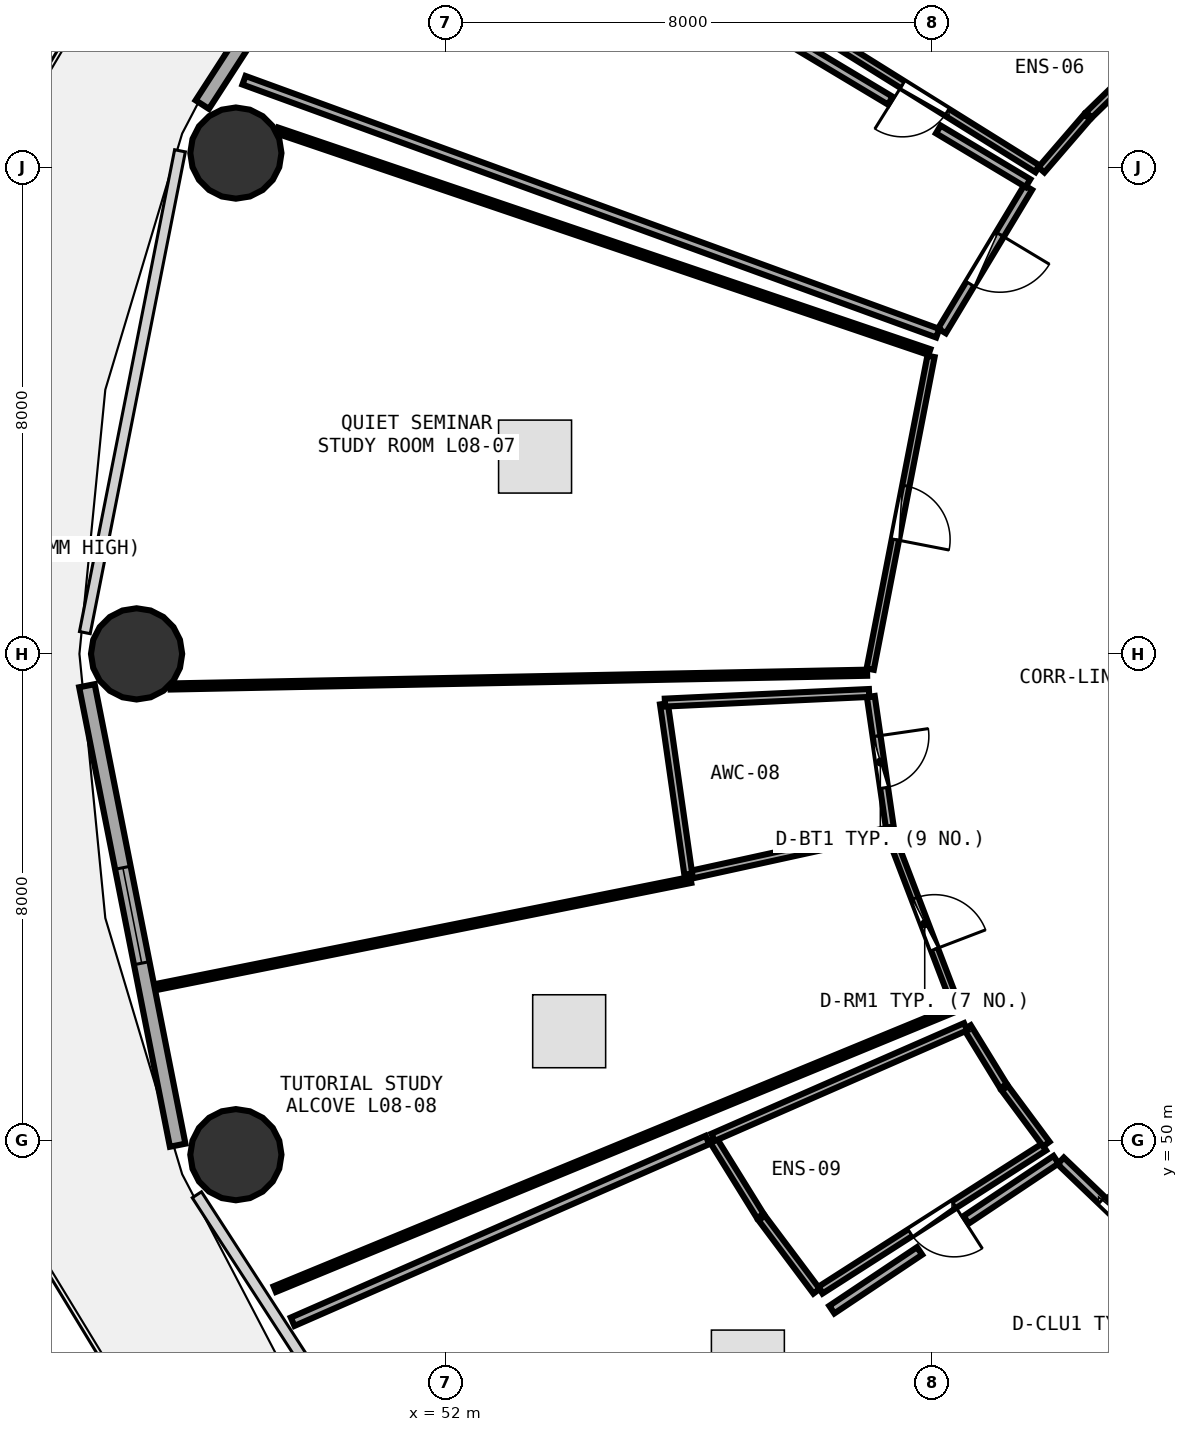
"""IFC4 building model, lengths in metres.
Left out: names, types, materials, properties, quantities, classifications, styles, units other than length and angle.
Written with IfcOpenShell. Run it as: python <this file> out.ifc"""

import sys

from ifc_helpers import new_model, si_unit, direction, frame, frame_2d, origin, origin_2d, place, context, subcontext, project, spatial, rectangle, circle, extrude, element, fill, save


model = new_model("IFC4")
c1 = context("Model", 3, precision=1e-05, world=origin(), true_north=direction((0.0, 1.0)))
c2 = subcontext(c1, "Body", "Model", "MODEL_VIEW")
j1 = project(units=[si_unit("LENGTHUNIT", "METRE"), si_unit("PLANEANGLEUNIT", "RADIAN")], contexts=[c1])
p1 = place(None, origin())
s1 = spatial("IfcSite", under=j1, at=p1, CompositionType="ELEMENT")
p2 = place(p1, origin())
s2 = spatial("IfcBuilding", under=s1, at=p2, CompositionType="ELEMENT")
p3 = place(p2, frame((0.0, 0.0, 33.75)))
s3 = spatial("IfcBuildingStorey", under=s2, at=p3, CompositionType="ELEMENT", Elevation=33.75)
for number, where, z_axis, x_axis in (
    (1, (48.553, 66.236, 0.0), (0.0, 0.0, 1.0), (1.0, 0.0, 0.0)),
    (2, (46.92, 58.0, 0.0), (0.0, 0.0, 1.0), (1.0, 0.0, 0.0)),
    (3, (48.553, 49.764, 0.0), (0.0, 0.0, 1.0), (1.0, 0.0, 0.0)),
):
    element("IfcColumn", number, at=place(p3, frame(where, z_axis=z_axis, x_axis=x_axis)), inside=s3, PredefinedType="COLUMN", context=c2, shape_type="SweptSolid", body=[
        extrude(circle(Radius=0.75, at=origin_2d()), origin(), (0.0, 0.0, 1.0), 3.75),
    ])
p4 = place(p3, frame((52.311, 73.698, 0.0), z_axis=(0.0, 0.0, 1.0), x_axis=(-0.543005114258, -0.839729388488, 0.0)))
e4 = element("IfcWall", 4, at=p4, inside=s3, PredefinedType="SOLIDWALL", context=c2, shape_type="SweptSolid", body=[
    extrude(rectangle(XDim=7.938, YDim=0.26, at=frame_2d((3.969, 0.0))), origin(), (0.0, 0.0, 1.0), 3.475),
])
p5 = place(p4, frame((3.494, 0.0, 0.0)))
e5 = element("IfcOpeningElement", 5, at=p5, cuts=e4, PredefinedType="OPENING", context=c2, shape_type="SweptSolid", body=[
    extrude(rectangle(XDim=0.95, YDim=2.1, at=frame_2d((0.475, 1.05))), frame((0.0, 0.14, 0.0), z_axis=(0.0, -1.0, 0.0), x_axis=(1.0, 0.0, 0.0)), (0.0, 0.0, 1.0), 0.28),
])
p6 = place(p4, frame((4.794, 0.0, 0.85)))
e6 = element("IfcOpeningElement", 6, at=p6, cuts=e4, PredefinedType="OPENING", context=c2, shape_type="SweptSolid", body=[
    extrude(rectangle(XDim=1.2, YDim=1.45, at=frame_2d((0.6, 0.725))), frame((0.0, 0.14, 0.0), z_axis=(0.0, -1.0, 0.0), x_axis=(1.0, 0.0, 0.0)), (0.0, 0.0, 1.0), 0.28),
])
p7 = place(p3, frame((46.104, 57.477, 0.0), z_axis=(0.0, 0.0, 1.0), x_axis=(0.193726159581, -0.98105564322, 0.0)))
e7 = element("IfcWall", 7, at=p7, inside=s3, PredefinedType="SOLIDWALL", context=c2, shape_type="SweptSolid", body=[
    extrude(rectangle(XDim=7.703, YDim=0.26, at=frame_2d((3.851, 0.0))), origin(), (0.0, 0.0, 1.0), 3.475),
])
p8 = place(p7, frame((3.051, 0.0, 0.85)))
e8 = element("IfcOpeningElement", 8, at=p8, cuts=e7, PredefinedType="OPENING", context=c2, shape_type="SweptSolid", body=[
    extrude(rectangle(XDim=1.6, YDim=1.45, at=frame_2d((0.8, 0.725))), frame((0.0, 0.14, 0.0), z_axis=(0.0, -1.0, 0.0), x_axis=(1.0, 0.0, 0.0)), (0.0, 0.0, 1.0), 0.28),
])
p9 = place(p3, frame((61.737, 65.977, 0.0), z_axis=(0.0, 0.0, 1.0), x_axis=(-0.848252205707, 0.529592480605, 0.0)))
e9 = element("IfcWall", 9, at=p9, inside=s3, PredefinedType="PLUMBINGWALL", context=c2, shape_type="SweptSolid", body=[
    extrude(rectangle(XDim=4.374, YDim=0.13, at=frame_2d((2.187, 0.0))), origin(), (0.0, 0.0, 1.0), 3.235),
])
p10 = place(p9, frame((1.757, 0.0, 0.0)))
e10 = element("IfcOpeningElement", 10, at=p10, cuts=e9, PredefinedType="OPENING", context=c2, shape_type="SweptSolid", body=[
    extrude(rectangle(XDim=0.86, YDim=2.05, at=frame_2d((0.43, 1.025))), frame((0.0, 0.075, 0.0), z_axis=(0.0, -1.0, 0.0), x_axis=(1.0, 0.0, 0.0)), (0.0, 0.0, 1.0), 0.15),
])
p11 = place(p3, frame((61.583, 65.67, 0.0), z_axis=(0.0, 0.0, 1.0), x_axis=(-0.515343511704, -0.85698370168, 0.0)))
e11 = element("IfcWall", 11, at=p11, inside=s3, PredefinedType="PARTITIONING", context=c2, shape_type="SweptSolid", body=[
    extrude(rectangle(XDim=2.752, YDim=0.15, at=frame_2d((1.376, 0.0))), origin(), (0.0, 0.0, 1.0), 2.875),
])
p12 = place(p11, frame((0.901, 0.0, 0.0)))
e12 = element("IfcOpeningElement", 12, at=p12, cuts=e11, PredefinedType="OPENING", context=c2, shape_type="SweptSolid", body=[
    extrude(rectangle(XDim=0.95, YDim=2.08, at=frame_2d((0.475, 1.04))), frame((0.0, 0.085, 0.0), z_axis=(0.0, -1.0, 0.0), x_axis=(1.0, 0.0, 0.0)), (0.0, 0.0, 1.0), 0.17),
])
p13 = place(p3, frame((59.986, 62.892, 0.0), z_axis=(0.0, 0.0, 1.0), x_axis=(-0.190897102704, -0.981610053015, 0.0)))
e13 = element("IfcWall", 13, at=p13, inside=s3, PredefinedType="PARTITIONING", context=c2, shape_type="SweptSolid", body=[
    extrude(rectangle(XDim=5.239, YDim=0.12, at=frame_2d((2.619, 0.0))), origin(), (0.0, 0.0, 1.0), 2.875),
])
p14 = place(p13, frame((2.169, 0.0, 0.0)))
e14 = element("IfcOpeningElement", 14, at=p14, cuts=e13, PredefinedType="OPENING", context=c2, shape_type="SweptSolid", body=[
    extrude(rectangle(XDim=0.9, YDim=2.08, at=frame_2d((0.45, 1.04))), frame((0.0, 0.07, 0.0), z_axis=(0.0, -1.0, 0.0), x_axis=(1.0, 0.0, 0.0)), (0.0, 0.0, 1.0), 0.14),
])
p15 = place(p3, frame((58.996, 57.299, 0.0), z_axis=(0.0, 0.0, 1.0), x_axis=(0.143746038715, -0.989614610014, 0.0)))
e15 = element("IfcWall", 15, at=p15, inside=s3, PredefinedType="PLUMBINGWALL", context=c2, shape_type="SweptSolid", body=[
    extrude(rectangle(XDim=2.176, YDim=0.13, at=frame_2d((1.088, 0.0))), origin(), (0.0, 0.0, 1.0), 3.48),
])
p16 = place(p15, frame((0.658, 0.0, 0.0)))
e16 = element("IfcOpeningElement", 16, at=p16, cuts=e15, PredefinedType="OPENING", context=c2, shape_type="SweptSolid", body=[
    extrude(rectangle(XDim=0.86, YDim=2.05, at=frame_2d((0.43, 1.025))), frame((0.0, 0.075, 0.0), z_axis=(0.0, -1.0, 0.0), x_axis=(1.0, 0.0, 0.0)), (0.0, 0.0, 1.0), 0.15),
])
p17 = place(p3, frame((59.373, 54.891, 0.0), z_axis=(0.0, 0.0, 1.0), x_axis=(0.357203455119, -0.934026601147, 0.0)))
e17 = element("IfcWall", 17, at=p17, inside=s3, PredefinedType="PARTITIONING", context=c2, shape_type="SweptSolid", body=[
    extrude(rectangle(XDim=2.848, YDim=0.12, at=frame_2d((1.424, 0.0))), origin(), (0.0, 0.0, 1.0), 3.48),
])
p18 = place(p17, frame((0.974, 0.0, 0.0)))
e18 = element("IfcOpeningElement", 18, at=p18, cuts=e17, PredefinedType="OPENING", context=c2, shape_type="SweptSolid", body=[
    extrude(rectangle(XDim=0.9, YDim=2.08, at=frame_2d((0.45, 1.04))), frame((0.0, 0.07, 0.0), z_axis=(0.0, -1.0, 0.0), x_axis=(1.0, 0.0, 0.0)), (0.0, 0.0, 1.0), 0.14),
])
p19 = place(p3, frame((61.844, 49.89, 0.0), z_axis=(0.0, 0.0, 1.0), x_axis=(-0.842235862163, -0.539109221297, 0.0)))
e19 = element("IfcWall", 19, at=p19, inside=s3, PredefinedType="PLUMBINGWALL", context=c2, shape_type="SweptSolid", body=[
    extrude(rectangle(XDim=4.367, YDim=0.13, at=frame_2d((2.184, 0.0))), origin(), (0.0, 0.0, 1.0), 3.235),
])
p20 = place(p19, frame((1.754, 0.0, 0.0)))
e20 = element("IfcOpeningElement", 20, at=p20, cuts=e19, PredefinedType="OPENING", context=c2, shape_type="SweptSolid", body=[
    extrude(rectangle(XDim=0.86, YDim=2.05, at=frame_2d((0.43, 1.025))), frame((0.0, 0.075, 0.0), z_axis=(0.0, -1.0, 0.0), x_axis=(1.0, 0.0, 0.0)), (0.0, 0.0, 1.0), 0.15),
])
p21 = place(p3, frame((62.118, 49.663, 0.0), z_axis=(0.0, 0.0, 1.0), x_axis=(0.721698326825, -0.692207718144, 0.0)))
e21 = element("IfcWall", 21, at=p21, inside=s3, PredefinedType="PARTITIONING", context=c2, shape_type="SweptSolid", body=[
    extrude(rectangle(XDim=2.823, YDim=0.15, at=frame_2d((1.412, 0.0))), origin(), (0.0, 0.0, 1.0), 2.875),
])
p22 = place(p21, frame((0.936, 0.0, 0.0)))
e22 = element("IfcOpeningElement", 22, at=p22, cuts=e21, PredefinedType="OPENING", context=c2, shape_type="SweptSolid", body=[
    extrude(rectangle(XDim=0.95, YDim=2.08, at=frame_2d((0.475, 1.04))), frame((0.0, 0.085, 0.0), z_axis=(0.0, -1.0, 0.0), x_axis=(1.0, 0.0, 0.0)), (0.0, 0.0, 1.0), 0.17),
])
p23 = place(p3, frame((63.414, 67.674, 0.0), z_axis=(0.0, 0.0, 1.0), x_axis=(-0.715868961368, -0.698234652642, 0.0)))
e23 = element("IfcWall", 23, at=p23, inside=s3, PredefinedType="PLUMBINGWALL", context=c2, shape_type="SweptSolid", body=[
    extrude(rectangle(XDim=1.163, YDim=0.13, at=frame_2d((0.582, 0.0))), origin(), (0.0, 0.0, 1.0), 2.875),
])
p24 = place(p3, frame((62.554, 66.833, 0.0), z_axis=(0.0, 0.0, 1.0), x_axis=(-0.6531951623, -0.757189593133, 0.0)))
e24 = element("IfcWall", 24, at=p24, inside=s3, PredefinedType="PLUMBINGWALL", context=c2, shape_type="SweptSolid", body=[
    extrude(rectangle(XDim=1.153, YDim=0.13, at=frame_2d((0.576, 0.0))), origin(), (0.0, 0.0, 1.0), 3.48),
])
p25 = place(p3, frame((60.143, 70.577, 0.0), z_axis=(0.0, 0.0, 1.0), x_axis=(0.750928130077, -0.660383936403, 0.0)))
e25 = element("IfcWall", 25, at=p25, inside=s3, PredefinedType="PLUMBINGWALL", context=c2, shape_type="SweptSolid", body=[
    extrude(rectangle(XDim=4.355, YDim=0.13, at=frame_2d((2.177, 0.0))), origin(), (0.0, 0.0, 1.0), 3.235),
])
p26 = place(p3, frame((60.096, 63.274, 0.0), z_axis=(0.0, 0.0, 1.0), x_axis=(-0.939512545551, 0.342514491304, 0.0)))
e26 = element("IfcWall", 26, at=p26, inside=s3, PredefinedType="PARTITIONING", context=c2, shape_type="SweptSolid", body=[
    extrude(rectangle(XDim=12.145, YDim=0.15, at=frame_2d((6.072, 0.0))), origin(), (0.0, 0.0, 1.0), 2.875),
])
p27 = place(p3, frame((57.75, 68.036, 0.0), z_axis=(0.0, 0.0, 1.0), x_axis=(0.857787746423, -0.514004068161, 0.0)))
e27 = element("IfcWall", 27, at=p27, inside=s3, PredefinedType="PARTITIONING", context=c2, shape_type="SweptSolid", body=[
    extrude(rectangle(XDim=1.826, YDim=0.15, at=frame_2d((0.913, 0.0))), origin(), (0.0, 0.0, 1.0), 3.48),
])
p28 = place(p3, frame((60.106, 66.625, 0.0), z_axis=(0.0, 0.0, 1.0), x_axis=(0.8577560852, -0.514056901814, 0.0)))
e28 = element("IfcWall", 28, at=p28, inside=s3, PredefinedType="PARTITIONING", context=c2, shape_type="SweptSolid", body=[
    extrude(rectangle(XDim=1.718, YDim=0.15, at=frame_2d((0.859, 0.0))), origin(), (0.0, 0.0, 1.0), 3.235),
])
p29 = place(p3, frame((58.934, 57.69, 0.0), z_axis=(0.0, 0.0, 1.0), x_axis=(-0.999804870307, -0.019754020094, 0.0)))
e29 = element("IfcWall", 29, at=p29, inside=s3, PredefinedType="PARTITIONING", context=c2, shape_type="SweptSolid", body=[
    extrude(rectangle(XDim=11.457, YDim=0.1, at=frame_2d((5.729, 0.0))), origin(), (0.0, 0.0, 1.0), 3.175),
])
p30 = place(p3, frame((49.233, 66.608, 0.0), z_axis=(0.0, 0.0, 1.0), x_axis=(0.946848647549, -0.321679403499, 0.0)))
e30 = element("IfcWall", 30, at=p30, inside=s3, PredefinedType="PARTITIONING", context=c2, shape_type="SweptSolid", body=[
    extrude(rectangle(XDim=11.328, YDim=0.1, at=frame_2d((5.664, 0.0))), origin(), (0.0, 0.0, 1.0), 2.875),
])
p31 = place(p3, frame((59.298, 55.082, 0.0), z_axis=(0.0, 0.0, 1.0), x_axis=(-0.97686777226, -0.213844231907, 0.0)))
e31 = element("IfcWall", 31, at=p31, inside=s3, PredefinedType="PLUMBINGWALL", context=c2, shape_type="SweptSolid", body=[
    extrude(rectangle(XDim=3.36, YDim=0.13, at=frame_2d((1.68, 0.0))), origin(), (0.0, 0.0, 1.0), 3.235),
])
p32 = place(p3, frame((55.993, 54.379, 0.0), z_axis=(0.0, 0.0, 1.0), x_axis=(-0.141590572172, 0.989925305198, 0.0)))
e32 = element("IfcWall", 32, at=p32, inside=s3, PredefinedType="PLUMBINGWALL", context=c2, shape_type="SweptSolid", body=[
    extrude(rectangle(XDim=2.828, YDim=0.13, at=frame_2d((1.414, 0.0))), origin(), (0.0, 0.0, 1.0), 3.48),
])
p33 = place(p3, frame((55.61, 57.199, 0.0), z_axis=(0.0, 0.0, 1.0), x_axis=(0.998891356447, 0.04707502538, 0.0)))
e33 = element("IfcWall", 33, at=p33, inside=s3, PredefinedType="PLUMBINGWALL", context=c2, shape_type="SweptSolid", body=[
    extrude(rectangle(XDim=3.361, YDim=0.13, at=frame_2d((1.68, 0.0))), origin(), (0.0, 0.0, 1.0), 3.235),
])
p34 = place(p3, frame((60.375, 52.16, 0.0), z_axis=(0.0, 0.0, 1.0), x_axis=(-0.924608681042, -0.380918346817, 0.0)))
e34 = element("IfcWall", 34, at=p34, inside=s3, PredefinedType="PARTITIONING", context=c2, shape_type="SweptSolid", body=[
    extrude(rectangle(XDim=12.094, YDim=0.1, at=frame_2d((6.047, 0.0))), origin(), (0.0, 0.0, 1.0), 2.875),
])
p35 = place(p3, frame((47.257, 52.525, 0.0), z_axis=(0.0, 0.0, 1.0), x_axis=(0.980535537362, 0.196341691878, 0.0)))
e35 = element("IfcWall", 35, at=p35, inside=s3, PredefinedType="PARTITIONING", context=c2, shape_type="SweptSolid", body=[
    extrude(rectangle(XDim=8.95, YDim=0.1, at=frame_2d((4.475, 0.0))), origin(), (0.0, 0.0, 1.0), 2.875),
])
p36 = place(p3, frame((60.583, 51.859, 0.0), z_axis=(0.0, 0.0, 1.0), x_axis=(0.52310141153, -0.852270446077, 0.0)))
e36 = element("IfcWall", 36, at=p36, inside=s3, PredefinedType="PLUMBINGWALL", context=c2, shape_type="SweptSolid", body=[
    extrude(rectangle(XDim=1.135, YDim=0.13, at=frame_2d((0.568, 0.0))), origin(), (0.0, 0.0, 1.0), 3.48),
])
p37 = place(p3, frame((61.2, 50.858, 0.0), z_axis=(0.0, 0.0, 1.0), x_axis=(0.595625136946, -0.803262532574, 0.0)))
e37 = element("IfcWall", 37, at=p37, inside=s3, PredefinedType="PLUMBINGWALL", context=c2, shape_type="SweptSolid", body=[
    extrude(rectangle(XDim=1.145, YDim=0.13, at=frame_2d((0.573, 0.0))), origin(), (0.0, 0.0, 1.0), 2.875),
])
p38 = place(p3, frame((58.103, 47.519, 0.0), z_axis=(0.0, 0.0, 1.0), x_axis=(-0.599662382917, 0.800253101533, 0.0)))
e38 = element("IfcWall", 38, at=p38, inside=s3, PredefinedType="PLUMBINGWALL", context=c2, shape_type="SweptSolid", body=[
    extrude(rectangle(XDim=1.504, YDim=0.13, at=frame_2d((0.752, 0.0))), origin(), (0.0, 0.0, 1.0), 3.48),
])
p39 = place(p3, frame((57.178, 48.756, 0.0), z_axis=(0.0, 0.0, 1.0), x_axis=(-0.526861637299, 0.849951066323, 0.0)))
e39 = element("IfcWall", 39, at=p39, inside=s3, PredefinedType="PLUMBINGWALL", context=c2, shape_type="SweptSolid", body=[
    extrude(rectangle(XDim=1.492, YDim=0.13, at=frame_2d((0.746, 0.0))), origin(), (0.0, 0.0, 1.0), 3.48),
])
p40 = place(p3, frame((56.4, 50.049, 0.0), z_axis=(0.0, 0.0, 1.0), x_axis=(0.91604857307, 0.401067340701, 0.0)))
e40 = element("IfcWall", 40, at=p40, inside=s3, PredefinedType="PLUMBINGWALL", context=c2, shape_type="SweptSolid", body=[
    extrude(rectangle(XDim=4.535, YDim=0.13, at=frame_2d((2.268, 0.0))), origin(), (0.0, 0.0, 1.0), 2.875),
])
p41 = place(p3, frame((64.171, 47.638, 0.0), z_axis=(0.0, 0.0, 1.0), x_axis=(-0.702465266663, -0.711718026421, 0.0)))
e41 = element("IfcWall", 41, at=p41, inside=s3, PredefinedType="PARTITIONING", context=c2, shape_type="SweptSolid", body=[
    extrude(rectangle(XDim=11.478, YDim=0.15, at=frame_2d((5.739, 0.0))), origin(), (0.0, 0.0, 1.0), 2.875),
])
p42 = place(p3, frame((49.487, 47.017, 0.0), z_axis=(0.0, 0.0, 1.0), x_axis=(0.915920983282, 0.401358633124, 0.0)))
e42 = element("IfcWall", 42, at=p42, inside=s3, PredefinedType="PARTITIONING", context=c2, shape_type="SweptSolid", body=[
    extrude(rectangle(XDim=7.449, YDim=0.15, at=frame_2d((3.725, 0.0))), origin(), (0.0, 0.0, 1.0), 2.875),
])
p43 = place(p3, frame((58.354, 47.216, 0.0), z_axis=(0.0, 0.0, 1.0), x_axis=(0.831292382958, 0.555835383937, 0.0)))
e43 = element("IfcWall", 43, at=p43, inside=s3, PredefinedType="PARTITIONING", context=c2, shape_type="SweptSolid", body=[
    extrude(rectangle(XDim=1.736, YDim=0.15, at=frame_2d((0.868, 0.0))), origin(), (0.0, 0.0, 1.0), 3.48),
])
p44 = place(p3, frame((60.563, 48.693, 0.0), z_axis=(0.0, 0.0, 1.0), x_axis=(0.831268380724, 0.555871279352, 0.0)))
e44 = element("IfcWall", 44, at=p44, inside=s3, PredefinedType="PARTITIONING", context=c2, shape_type="SweptSolid", body=[
    extrude(rectangle(XDim=1.779, YDim=0.15, at=frame_2d((0.89, 0.0))), origin(), (0.0, 0.0, 1.0), 3.235),
])
p45 = place(p3, frame((56.622, 39.085, 0.0), z_axis=(0.0, 0.0, 1.0), x_axis=(0.684539394854, 0.728975868526, 0.0)))
e45 = element("IfcWall", 45, at=p45, inside=s3, PredefinedType="PARTITIONING", context=c2, shape_type="SweptSolid", body=[
    extrude(rectangle(XDim=11.439, YDim=0.1, at=frame_2d((5.719, 0.0))), origin(), (0.0, 0.0, 1.0), 2.875),
])
p46 = place(p8, origin())
e46 = element("IfcWindow", 46, at=p46, inside=s3, PartitioningType="SINGLE_PANEL", PredefinedType="WINDOW", context=c2, shape_type="SweptSolid", body=[
    extrude(rectangle(XDim=1.6, YDim=1.45, at=frame_2d((0.8, 0.725))), frame((0.0, 0.03, 0.0), z_axis=(0.0, -1.0, 0.0), x_axis=(1.0, 0.0, 0.0)), (0.0, 0.0, 1.0), 0.06),
])
fill(e8, e46)
p47 = place(p10, origin())
e47 = element("IfcDoor", 47, at=p47, inside=s3, OperationType="SINGLE_SWING_RIGHT", PredefinedType="DOOR", context=c2, shape_type="SweptSolid", body=[
    extrude(rectangle(XDim=0.86, YDim=2.05, at=frame_2d((0.43, 1.025))), frame((0.0, 0.025, 0.0), z_axis=(0.0, -1.0, 0.0), x_axis=(1.0, 0.0, 0.0)), (0.0, 0.0, 1.0), 0.05),
])
fill(e10, e47)
p48 = place(p12, origin())
e48 = element("IfcDoor", 48, at=p48, inside=s3, OperationType="SINGLE_SWING_LEFT", PredefinedType="DOOR", context=c2, shape_type="SweptSolid", body=[
    extrude(rectangle(XDim=0.95, YDim=2.08, at=frame_2d((0.475, 1.04))), frame((0.0, 0.025, 0.0), z_axis=(0.0, -1.0, 0.0), x_axis=(1.0, 0.0, 0.0)), (0.0, 0.0, 1.0), 0.05),
])
fill(e12, e48)
p49 = place(p14, origin())
e49 = element("IfcDoor", 49, at=p49, inside=s3, OperationType="SINGLE_SWING_RIGHT", PredefinedType="DOOR", context=c2, shape_type="SweptSolid", body=[
    extrude(rectangle(XDim=0.9, YDim=2.08, at=frame_2d((0.45, 1.04))), frame((0.0, 0.025, 0.0), z_axis=(0.0, -1.0, 0.0), x_axis=(1.0, 0.0, 0.0)), (0.0, 0.0, 1.0), 0.05),
])
fill(e14, e49)
p50 = place(p16, origin())
e50 = element("IfcDoor", 50, at=p50, inside=s3, OperationType="SINGLE_SWING_LEFT", PredefinedType="DOOR", context=c2, shape_type="SweptSolid", body=[
    extrude(rectangle(XDim=0.86, YDim=2.05, at=frame_2d((0.43, 1.025))), frame((0.0, 0.025, 0.0), z_axis=(0.0, -1.0, 0.0), x_axis=(1.0, 0.0, 0.0)), (0.0, 0.0, 1.0), 0.05),
])
fill(e16, e50)
p51 = place(p18, origin())
e51 = element("IfcDoor", 51, at=p51, inside=s3, OperationType="SINGLE_SWING_RIGHT", PredefinedType="DOOR", context=c2, shape_type="SweptSolid", body=[
    extrude(rectangle(XDim=0.9, YDim=2.08, at=frame_2d((0.45, 1.04))), frame((0.0, 0.025, 0.0), z_axis=(0.0, -1.0, 0.0), x_axis=(1.0, 0.0, 0.0)), (0.0, 0.0, 1.0), 0.05),
])
fill(e18, e51)
p52 = place(p20, origin())
e52 = element("IfcDoor", 52, at=p52, inside=s3, OperationType="SINGLE_SWING_LEFT", PredefinedType="DOOR", context=c2, shape_type="SweptSolid", body=[
    extrude(rectangle(XDim=0.86, YDim=2.05, at=frame_2d((0.43, 1.025))), frame((0.0, 0.025, 0.0), z_axis=(0.0, -1.0, 0.0), x_axis=(1.0, 0.0, 0.0)), (0.0, 0.0, 1.0), 0.05),
])
fill(e20, e52)
p53 = place(p22, origin())
e53 = element("IfcDoor", 53, at=p53, inside=s3, OperationType="SINGLE_SWING_RIGHT", PredefinedType="DOOR", context=c2, shape_type="SweptSolid", body=[
    extrude(rectangle(XDim=0.95, YDim=2.08, at=frame_2d((0.475, 1.04))), frame((0.0, 0.025, 0.0), z_axis=(0.0, -1.0, 0.0), x_axis=(1.0, 0.0, 0.0)), (0.0, 0.0, 1.0), 0.05),
])
fill(e22, e53)
save(model, sys.argv[1])
